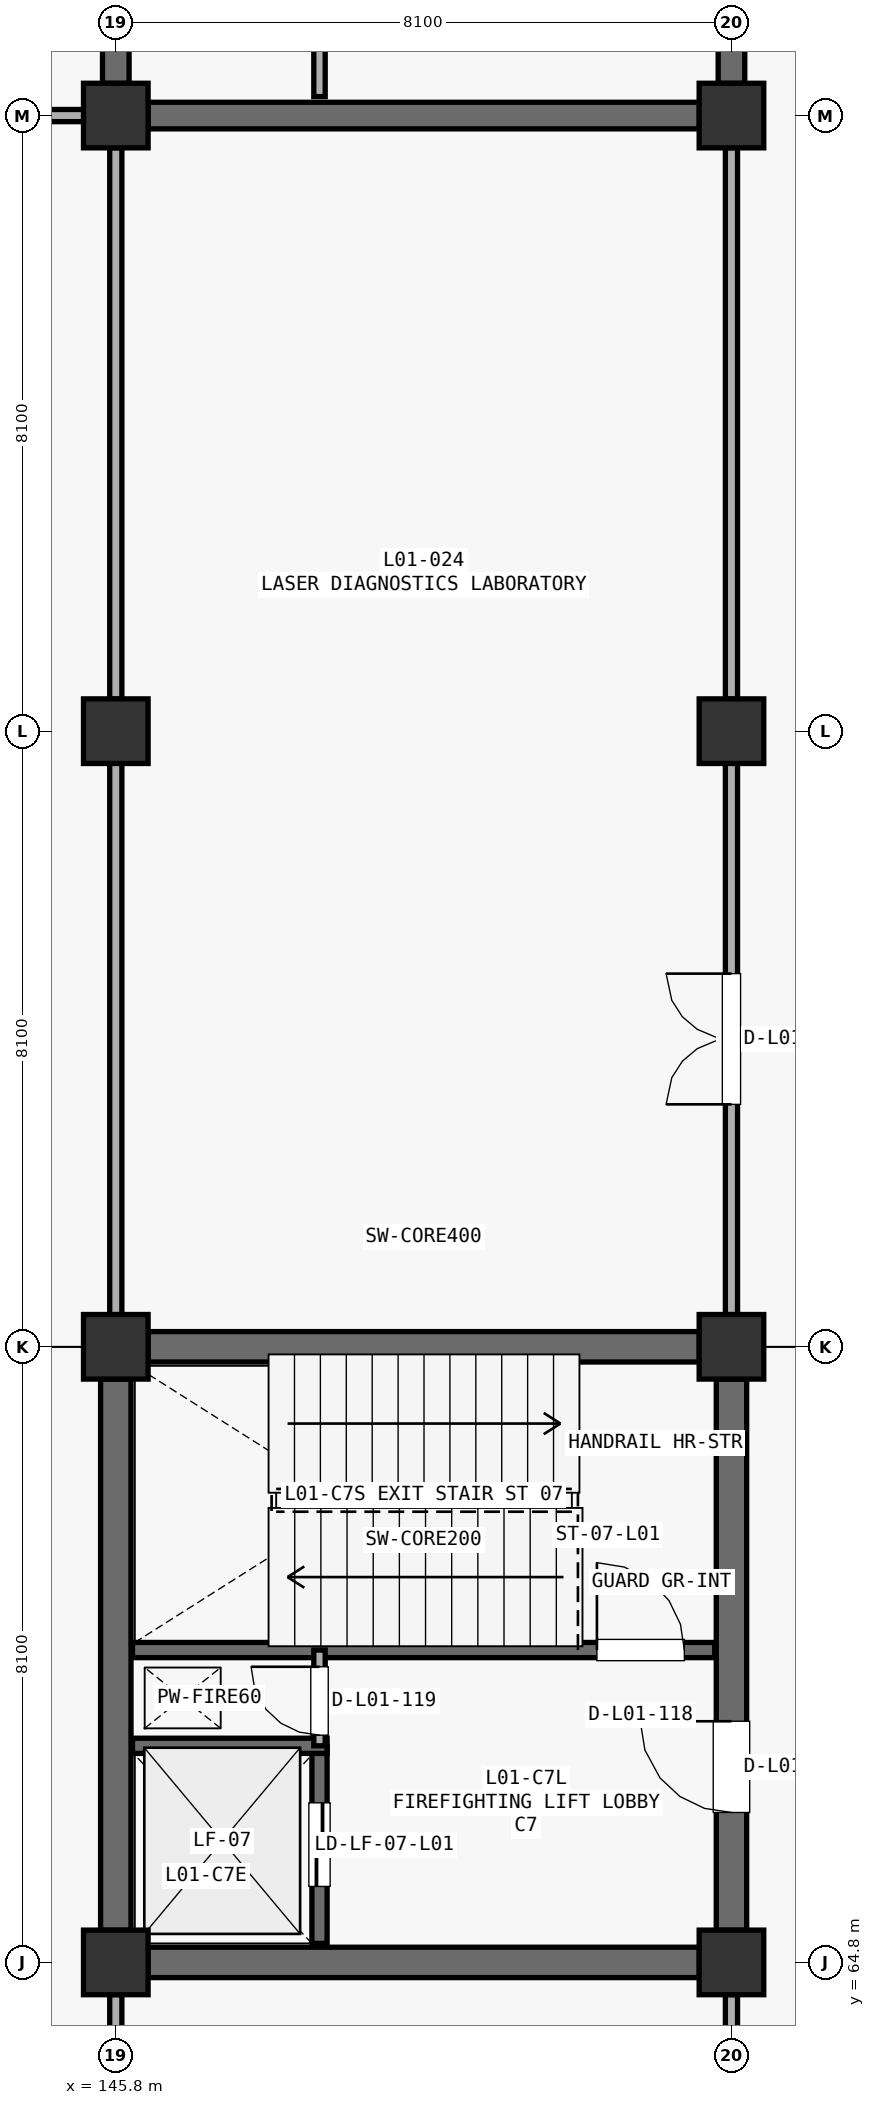
"""IFC4 building model, lengths in metres.
Left out: names, types, materials, properties, quantities, classifications, styles, units other than length and angle.
Written with IfcOpenShell. Run it as: python <this file> out.ifc"""

import sys

from ifc_helpers import new_model, si_unit, direction, frame, frame_2d, origin, origin_2d, place, context, subcontext, project, spatial, rectangle, extrude, element, fill, save


model = new_model("IFC4")
c1 = context("Model", 3, precision=1e-05, world=origin(), true_north=direction((0.0, 1.0)))
c2 = subcontext(c1, "Body", "Model", "MODEL_VIEW")
j1 = project(units=[si_unit("LENGTHUNIT", "METRE"), si_unit("PLANEANGLEUNIT", "RADIAN")], contexts=[c1])
p1 = place(None, origin())
s1 = spatial("IfcSite", under=j1, at=p1, CompositionType="ELEMENT")
p2 = place(p1, origin())
s2 = spatial("IfcBuilding", under=s1, at=p2, CompositionType="ELEMENT")
p3 = place(p2, frame((0.0, 0.0, 5.1)))
s3 = spatial("IfcBuildingStorey", under=s2, at=p3, CompositionType="ELEMENT", Elevation=5.1)
for number, where, z_axis, x_axis in (
    (1, (145.8, 64.8, 0.0), (0.0, 0.0, 1.0), (1.0, 0.0, 0.0)),
    (2, (145.8, 72.9, 0.0), (0.0, 0.0, 1.0), (1.0, 0.0, 0.0)),
    (3, (145.8, 81.0, 0.0), (0.0, 0.0, 1.0), (1.0, 0.0, 0.0)),
    (4, (145.8, 89.1, 0.0), (0.0, 0.0, 1.0), (1.0, 0.0, 0.0)),
    (5, (153.9, 64.8, 0.0), (0.0, 0.0, 1.0), (1.0, 0.0, 0.0)),
    (6, (153.9, 72.9, 0.0), (0.0, 0.0, 1.0), (1.0, 0.0, 0.0)),
    (7, (153.9, 81.0, 0.0), (0.0, 0.0, 1.0), (1.0, 0.0, 0.0)),
    (8, (153.9, 89.1, 0.0), (0.0, 0.0, 1.0), (1.0, 0.0, 0.0)),
):
    element("IfcColumn", number, at=place(p3, frame(where, z_axis=z_axis, x_axis=x_axis)), inside=s3, PredefinedType="COLUMN", context=c2, shape_type="SweptSolid", body=[
        extrude(rectangle(XDim=0.85, YDim=0.85, at=origin_2d()), origin(), (0.0, 0.0, 1.0), 4.59),
    ])
for number, where, z_axis, x_axis in (
    (9, (146.223, 72.9, 0.0), (0.0, 0.0, 1.0), (1.0, 0.0, 0.0)),
    (10, (145.8, 65.223, 0.0), (0.0, 0.0, 1.0), (0.0, 1.0, 0.0)),
):
    element("IfcWall", number, at=place(p3, frame(where, z_axis=z_axis, x_axis=x_axis)), inside=s3, PredefinedType="SHEAR", context=c2, shape_type="SweptSolid", body=[
        extrude(rectangle(XDim=7.254, YDim=0.4, at=frame_2d((3.627, 0.0))), origin(), (0.0, 0.0, 1.0), 4.312),
    ])
p4 = place(p3, frame((153.9, 65.223, 0.0), z_axis=(0.0, 0.0, 1.0), x_axis=(0.0, 1.0, 0.0)))
e11 = element("IfcWall", 11, at=p4, inside=s3, PredefinedType="SHEAR", context=c2, shape_type="SweptSolid", body=[
    extrude(rectangle(XDim=7.254, YDim=0.4, at=frame_2d((3.627, 0.0))), origin(), (0.0, 0.0, 1.0), 4.312),
])
p5 = place(p4, frame((1.55, 0.0, 0.0)))
e12 = element("IfcOpeningElement", 12, at=p5, cuts=e11, PredefinedType="OPENING", context=c2, shape_type="SweptSolid", body=[
    extrude(rectangle(XDim=1.2, YDim=2.2, at=frame_2d((0.6, 1.1))), frame((0.0, 0.21, 0.0), z_axis=(0.0, -1.0, 0.0), x_axis=(1.0, 0.0, 0.0)), (0.0, 0.0, 1.0), 0.42),
])
p6 = place(p3, frame((146.223, 64.8, 0.0), z_axis=(0.0, 0.0, 1.0), x_axis=(1.0, 0.0, 0.0)))
e13 = element("IfcWall", 13, at=p6, inside=s3, PredefinedType="SHEAR", context=c2, shape_type="SweptSolid", body=[
    extrude(rectangle(XDim=7.254, YDim=0.4, at=frame_2d((3.627, 0.0))), origin(), (0.0, 0.0, 1.0), 4.312),
])
p7 = place(p3, frame((146.02, 68.91, 0.0), z_axis=(0.0, 0.0, 1.0), x_axis=(1.0, 0.0, 0.0)))
e14 = element("IfcWall", 14, at=p7, inside=s3, PredefinedType="SHEAR", context=c2, shape_type="SweptSolid", body=[
    extrude(rectangle(XDim=7.66, YDim=0.2, at=frame_2d((3.83, 0.0))), origin(), (0.0, 0.0, 1.0), 4.312),
])
p8 = place(p7, frame((6.11, 0.0, 0.0)))
e15 = element("IfcOpeningElement", 15, at=p8, cuts=e14, PredefinedType="OPENING", context=c2, shape_type="SweptSolid", body=[
    extrude(rectangle(XDim=1.15, YDim=2.2, at=frame_2d((0.575, 1.1))), frame((0.0, 0.11, 0.0), z_axis=(0.0, -1.0, 0.0), x_axis=(1.0, 0.0, 0.0)), (0.0, 0.0, 1.0), 0.22),
])
p9 = place(p3, frame((148.48, 65.05, 0.0), z_axis=(0.0, 0.0, 1.0), x_axis=(0.0, 1.0, 0.0)))
e16 = element("IfcWall", 16, at=p9, inside=s3, PredefinedType="SHEAR", context=c2, shape_type="SweptSolid", body=[
    extrude(rectangle(XDim=2.6, YDim=0.2, at=frame_2d((1.3, 0.0))), origin(), (0.0, 0.0, 1.0), 4.312),
])
p10 = place(p9, frame((0.75, 0.0, 0.0)))
e17 = element("IfcOpeningElement", 17, at=p10, cuts=e16, PredefinedType="OPENING", context=c2, shape_type="SweptSolid", body=[
    extrude(rectangle(XDim=1.1, YDim=2.2, at=frame_2d((0.55, 1.1))), frame((0.0, 0.11, 0.0), z_axis=(0.0, -1.0, 0.0), x_axis=(1.0, 0.0, 0.0)), (0.0, 0.0, 1.0), 0.22),
])
p11 = place(p3, frame((146.02, 67.65, 0.0), z_axis=(0.0, 0.0, 1.0), x_axis=(1.0, 0.0, 0.0)))
e18 = element("IfcWall", 18, at=p11, inside=s3, PredefinedType="SHEAR", context=c2, shape_type="SweptSolid", body=[
    extrude(rectangle(XDim=2.56, YDim=0.2, at=frame_2d((1.28, 0.0))), origin(), (0.0, 0.0, 1.0), 4.312),
])
p12 = place(p3, frame((148.48, 67.65, 0.0), z_axis=(0.0, 0.0, 1.0), x_axis=(0.0, 1.0, 0.0)))
e19 = element("IfcWall", 19, at=p12, inside=s3, PredefinedType="PARTITIONING", context=c2, shape_type="SweptSolid", body=[
    extrude(rectangle(XDim=1.26, YDim=0.15, at=frame_2d((0.63, 0.0))), origin(), (0.0, 0.0, 1.0), 4.312),
])
p13 = place(p12, frame((0.14, 0.0, 0.0)))
e20 = element("IfcOpeningElement", 20, at=p13, cuts=e19, PredefinedType="OPENING", context=c2, shape_type="SweptSolid", body=[
    extrude(rectangle(XDim=0.9, YDim=2.15, at=frame_2d((0.45, 1.075))), frame((0.0, 0.085, 0.0), z_axis=(0.0, -1.0, 0.0), x_axis=(1.0, 0.0, 0.0)), (0.0, 0.0, 1.0), 0.17),
])
p14 = place(p3, frame((145.8, 89.523, 0.0), z_axis=(0.0, 0.0, 1.0), x_axis=(0.0, 1.0, 0.0)))
e21 = element("IfcWall", 21, at=p14, inside=s3, PredefinedType="SHEAR", context=c2, shape_type="SweptSolid", body=[
    extrude(rectangle(XDim=7.254, YDim=0.35, at=frame_2d((3.627, 0.0))), origin(), (0.0, 0.0, 1.0), 4.312),
])
p15 = place(p3, frame((153.9, 89.523, 0.0), z_axis=(0.0, 0.0, 1.0), x_axis=(0.0, 1.0, 0.0)))
e22 = element("IfcWall", 22, at=p15, inside=s3, PredefinedType="SHEAR", context=c2, shape_type="SweptSolid", body=[
    extrude(rectangle(XDim=7.254, YDim=0.35, at=frame_2d((3.627, 0.0))), origin(), (0.0, 0.0, 1.0), 4.312),
])
p16 = place(p15, frame((1.55, 0.0, 0.0)))
e23 = element("IfcOpeningElement", 23, at=p16, cuts=e22, PredefinedType="OPENING", context=c2, shape_type="SweptSolid", body=[
    extrude(rectangle(XDim=1.2, YDim=2.2, at=frame_2d((0.6, 1.1))), frame((0.0, 0.185, 0.0), z_axis=(0.0, -1.0, 0.0), x_axis=(1.0, 0.0, 0.0)), (0.0, 0.0, 1.0), 0.37),
])
p17 = place(p3, frame((146.223, 89.1, 0.0), z_axis=(0.0, 0.0, 1.0), x_axis=(1.0, 0.0, 0.0)))
e24 = element("IfcWall", 24, at=p17, inside=s3, PredefinedType="SHEAR", context=c2, shape_type="SweptSolid", body=[
    extrude(rectangle(XDim=7.254, YDim=0.35, at=frame_2d((3.627, 0.0))), origin(), (0.0, 0.0, 1.0), 4.312),
])
p18 = place(p3, frame((148.48, 89.35, 0.0), z_axis=(0.0, 0.0, 1.0), x_axis=(0.0, 1.0, 0.0)))
e25 = element("IfcWall", 25, at=p18, inside=s3, PredefinedType="PARTITIONING", context=c2, shape_type="SweptSolid", body=[
    extrude(rectangle(XDim=2.6, YDim=0.15, at=frame_2d((1.3, 0.0))), origin(), (0.0, 0.0, 1.0), 4.312),
])
p19 = place(p18, frame((0.8, 0.0, 0.0)))
e26 = element("IfcOpeningElement", 26, at=p19, cuts=e25, PredefinedType="OPENING", context=c2, shape_type="SweptSolid", body=[
    extrude(rectangle(XDim=0.95, YDim=2.15, at=frame_2d((0.475, 1.075))), frame((0.0, 0.085, 0.0), z_axis=(0.0, -1.0, 0.0), x_axis=(1.0, 0.0, 0.0)), (0.0, 0.0, 1.0), 0.17),
])
p20 = place(p3, frame((145.8, 57.123, 0.0), z_axis=(0.0, 0.0, 1.0), x_axis=(0.0, 1.0, 0.0)))
e27 = element("IfcWall", 27, at=p20, inside=s3, PredefinedType="PARTITIONING", context=c2, shape_type="SweptSolid", body=[
    extrude(rectangle(XDim=7.254, YDim=0.16, at=frame_2d((3.627, 0.0))), origin(), (0.0, 0.0, 1.0), 3.562),
])
p21 = place(p20, frame((2.877, 0.0, 0.0)))
e28 = element("IfcOpeningElement", 28, at=p21, cuts=e27, PredefinedType="OPENING", context=c2, shape_type="SweptSolid", body=[
    extrude(rectangle(XDim=1.5, YDim=2.2, at=frame_2d((0.75, 1.1))), frame((0.0, 0.09, 0.0), z_axis=(0.0, -1.0, 0.0), x_axis=(1.0, 0.0, 0.0)), (0.0, 0.0, 1.0), 0.18),
])
p22 = place(p3, frame((145.8, 73.323, 0.0), z_axis=(0.0, 0.0, 1.0), x_axis=(0.0, 1.0, 0.0)))
e29 = element("IfcWall", 29, at=p22, inside=s3, PredefinedType="PARTITIONING", context=c2, shape_type="SweptSolid", body=[
    extrude(rectangle(XDim=7.254, YDim=0.16, at=frame_2d((3.627, 0.0))), origin(), (0.0, 0.0, 1.0), 3.712),
])
p23 = place(p3, frame((145.8, 81.423, 0.0), z_axis=(0.0, 0.0, 1.0), x_axis=(0.0, 1.0, 0.0)))
e30 = element("IfcWall", 30, at=p23, inside=s3, PredefinedType="PARTITIONING", context=c2, shape_type="SweptSolid", body=[
    extrude(rectangle(XDim=7.254, YDim=0.16, at=frame_2d((3.627, 0.0))), origin(), (0.0, 0.0, 1.0), 3.462),
])
p24 = place(p3, frame((138.123, 89.1, 0.0), z_axis=(0.0, 0.0, 1.0), x_axis=(1.0, 0.0, 0.0)))
e31 = element("IfcWall", 31, at=p24, inside=s3, PredefinedType="PARTITIONING", context=c2, shape_type="SweptSolid", body=[
    extrude(rectangle(XDim=7.254, YDim=0.16, at=frame_2d((3.627, 0.0))), origin(), (0.0, 0.0, 1.0), 3.562),
])
p25 = place(p3, frame((153.9, 73.323, 0.0), z_axis=(0.0, 0.0, 1.0), x_axis=(0.0, 1.0, 0.0)))
e32 = element("IfcWall", 32, at=p25, inside=s3, PredefinedType="PARTITIONING", context=c2, shape_type="SweptSolid", body=[
    extrude(rectangle(XDim=7.254, YDim=0.16, at=frame_2d((3.627, 0.0))), origin(), (0.0, 0.0, 1.0), 3.362),
])
p26 = place(p25, frame((2.767, 0.0, 0.0)))
e33 = element("IfcOpeningElement", 33, at=p26, cuts=e32, PredefinedType="OPENING", context=c2, shape_type="SweptSolid", body=[
    extrude(rectangle(XDim=1.72, YDim=2.3, at=frame_2d((0.86, 1.15))), frame((0.0, 0.09, 0.0), z_axis=(0.0, -1.0, 0.0), x_axis=(1.0, 0.0, 0.0)), (0.0, 0.0, 1.0), 0.18),
])
p27 = place(p3, frame((153.9, 81.423, 0.0), z_axis=(0.0, 0.0, 1.0), x_axis=(0.0, 1.0, 0.0)))
e34 = element("IfcWall", 34, at=p27, inside=s3, PredefinedType="PARTITIONING", context=c2, shape_type="SweptSolid", body=[
    extrude(rectangle(XDim=7.254, YDim=0.16, at=frame_2d((3.627, 0.0))), origin(), (0.0, 0.0, 1.0), 3.562),
])
p28 = place(p3, frame((153.9, 57.123, 0.0), z_axis=(0.0, 0.0, 1.0), x_axis=(0.0, 1.0, 0.0)))
e35 = element("IfcWall", 35, at=p28, inside=s3, PredefinedType="PARTITIONING", context=c2, shape_type="SweptSolid", body=[
    extrude(rectangle(XDim=7.254, YDim=0.16, at=frame_2d((3.627, 0.0))), origin(), (0.0, 0.0, 1.0), 3.712),
])
p29 = place(p28, frame((2.837, 0.0, 0.0)))
e36 = element("IfcOpeningElement", 36, at=p29, cuts=e35, PredefinedType="OPENING", context=c2, shape_type="SweptSolid", body=[
    extrude(rectangle(XDim=1.58, YDim=2.2, at=frame_2d((0.79, 1.1))), frame((0.0, 0.09, 0.0), z_axis=(0.0, -1.0, 0.0), x_axis=(1.0, 0.0, 0.0)), (0.0, 0.0, 1.0), 0.18),
])
p30 = place(p5, origin())
e37 = element("IfcDoor", 37, at=p30, inside=s3, OperationType="SINGLE_SWING_RIGHT", PredefinedType="DOOR", context=c2, shape_type="SweptSolid", body=[
    extrude(rectangle(XDim=1.2, YDim=2.2, at=frame_2d((0.6, 1.1))), frame((0.0, 0.025, 0.0), z_axis=(0.0, -1.0, 0.0), x_axis=(1.0, 0.0, 0.0)), (0.0, 0.0, 1.0), 0.05),
])
fill(e12, e37)
p31 = place(p8, origin())
e38 = element("IfcDoor", 38, at=p31, inside=s3, OperationType="SINGLE_SWING_LEFT", PredefinedType="DOOR", context=c2, shape_type="SweptSolid", body=[
    extrude(rectangle(XDim=1.15, YDim=2.2, at=frame_2d((0.575, 1.1))), frame((0.0, 0.025, 0.0), z_axis=(0.0, -1.0, 0.0), x_axis=(1.0, 0.0, 0.0)), (0.0, 0.0, 1.0), 0.05),
])
fill(e15, e38)
p32 = place(p10, origin())
e39 = element("IfcDoor", 39, at=p32, inside=s3, OperationType="SLIDING_TO_LEFT", PredefinedType="DOOR", context=c2, shape_type="SweptSolid", body=[
    extrude(rectangle(XDim=1.1, YDim=2.2, at=frame_2d((0.55, 1.1))), frame((0.0, 0.025, 0.0), z_axis=(0.0, -1.0, 0.0), x_axis=(1.0, 0.0, 0.0)), (0.0, 0.0, 1.0), 0.05),
])
fill(e17, e39)
p33 = place(p13, origin())
e40 = element("IfcDoor", 40, at=p33, inside=s3, OperationType="SINGLE_SWING_RIGHT", PredefinedType="DOOR", context=c2, shape_type="SweptSolid", body=[
    extrude(rectangle(XDim=0.9, YDim=2.15, at=frame_2d((0.45, 1.075))), frame((0.0, 0.025, 0.0), z_axis=(0.0, -1.0, 0.0), x_axis=(1.0, 0.0, 0.0)), (0.0, 0.0, 1.0), 0.05),
])
fill(e20, e40)
p34 = place(p26, origin())
e41 = element("IfcDoor", 41, at=p34, inside=s3, OperationType="DOUBLE_SWING_LEFT", PredefinedType="DOOR", context=c2, shape_type="SweptSolid", body=[
    extrude(rectangle(XDim=1.72, YDim=2.3, at=frame_2d((0.86, 1.15))), frame((0.0, 0.025, 0.0), z_axis=(0.0, -1.0, 0.0), x_axis=(1.0, 0.0, 0.0)), (0.0, 0.0, 1.0), 0.05),
])
fill(e33, e41)
save(model, sys.argv[1])
